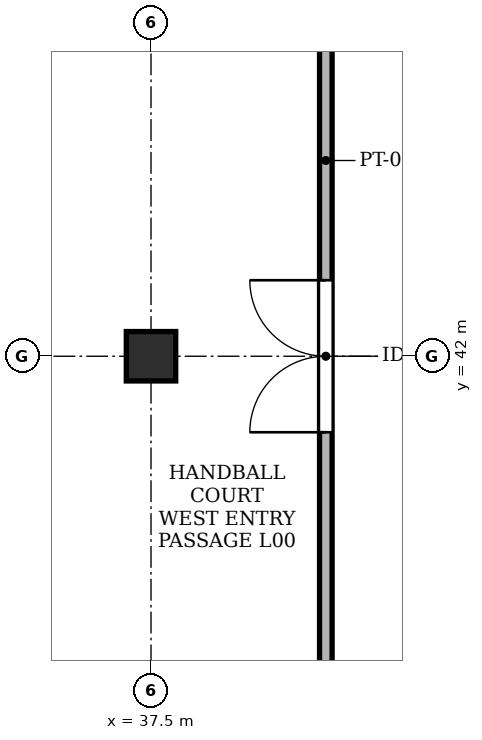
"""IFC4 building model, lengths in metres.
Left out: names, types, materials, properties, quantities, classifications, styles, units other than length and angle.
Written with IfcOpenShell. Run it as: python <this file> out.ifc"""

import sys

from ifc_helpers import new_model, si_unit, direction, frame, frame_2d, origin, origin_2d, place, context, subcontext, project, spatial, rectangle, extrude, element, fill, save


model = new_model("IFC4")
c1 = context("Model", 3, precision=1e-05, world=origin(), true_north=direction((0.0, 1.0)))
c2 = subcontext(c1, "Body", "Model", "MODEL_VIEW")
j1 = project(units=[si_unit("LENGTHUNIT", "METRE"), si_unit("PLANEANGLEUNIT", "RADIAN")], contexts=[c1])
p1 = place(None, origin())
s1 = spatial("IfcSite", under=j1, at=p1, CompositionType="ELEMENT")
p2 = place(p1, origin())
s2 = spatial("IfcBuilding", under=s1, at=p2, CompositionType="ELEMENT")
p3 = place(p2, origin())
s3 = spatial("IfcBuildingStorey", under=s2, at=p3, CompositionType="ELEMENT", Elevation=0.0)
p4 = place(p3, frame((37.5, 42.0, -0.35), z_axis=(0.0, 0.0, 1.0), x_axis=(1.0, 0.0, 0.0)))
e1 = element("IfcColumn", 1, at=p4, inside=s3, PredefinedType="COLUMN", context=c2, shape_type="SweptSolid", body=[
    extrude(rectangle(XDim=0.65, YDim=0.65, at=origin_2d()), origin(), (0.0, 0.0, 1.0), 4.65),
])
p5 = place(p3, frame((39.8, 28.95, 0.0), z_axis=(0.0, 0.0, 1.0), x_axis=(0.0, 1.0, 0.0)))
e2 = element("IfcWall", 2, at=p5, inside=s3, PredefinedType="PARTITIONING", context=c2, shape_type="SweptSolid", body=[
    extrude(rectangle(XDim=26.1, YDim=0.165, at=frame_2d((13.05, 0.0))), origin(), (0.0, 0.0, 1.0), 3.88),
])
p6 = place(p5, frame((12.05, 0.0, 0.0)))
e3 = element("IfcOpeningElement", 3, at=p6, cuts=e2, PredefinedType="OPENING", context=c2, shape_type="SweptSolid", body=[
    extrude(rectangle(XDim=2.0, YDim=2.35, at=frame_2d((1.0, 1.175))), frame((0.0, 0.094, 0.0), z_axis=(0.0, -1.0, 0.0), x_axis=(1.0, 0.0, 0.0)), (0.0, 0.0, 1.0), 0.189),
])
p7 = place(p6, origin())
e4 = element("IfcDoor", 4, at=p7, inside=s3, OperationType="DOUBLE_DOOR_SINGLE_SWING", PredefinedType="DOOR", context=c2, shape_type="SweptSolid", body=[
    extrude(rectangle(XDim=2.0, YDim=2.35, at=frame_2d((1.0, 1.175))), frame((0.0, 0.025, 0.0), z_axis=(0.0, -1.0, 0.0), x_axis=(1.0, 0.0, 0.0)), (0.0, 0.0, 1.0), 0.05),
])
fill(e3, e4)
save(model, sys.argv[1])
